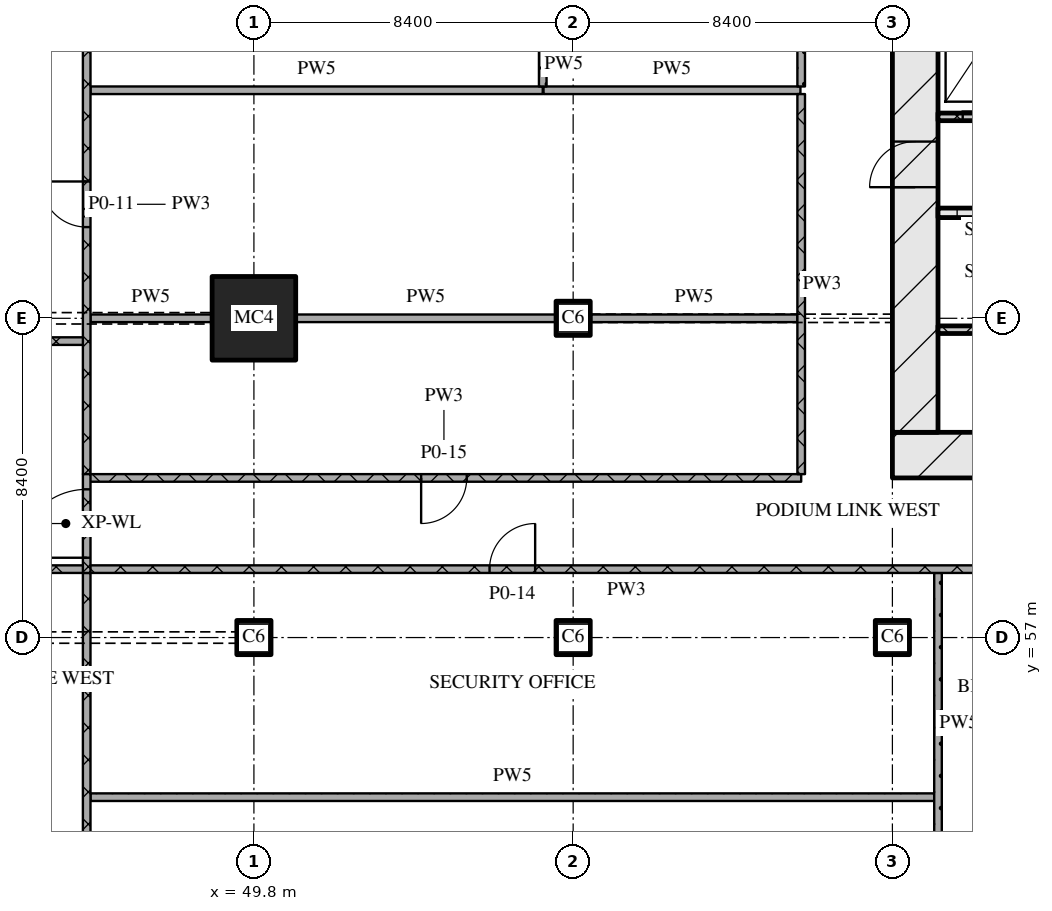
"""IFC4 building model, lengths in metres.
Left out: names, types, materials, properties, quantities, classifications, styles, units other than length and angle.
Written with IfcOpenShell. Run it as: python <this file> out.ifc"""

import sys

from ifc_helpers import new_model, si_unit, direction, frame, frame_2d, origin, origin_2d, place, context, subcontext, project, spatial, rectangle, extrude, element, fill, save


model = new_model("IFC4")
c1 = context("Model", 3, precision=1e-05, world=origin(), true_north=direction((0.0, 1.0)))
c2 = subcontext(c1, "Body", "Model", "MODEL_VIEW")
j1 = project(units=[si_unit("LENGTHUNIT", "METRE"), si_unit("PLANEANGLEUNIT", "RADIAN")], contexts=[c1])
p1 = place(None, origin())
s1 = spatial("IfcSite", under=j1, at=p1, CompositionType="ELEMENT")
p2 = place(p1, origin())
s2 = spatial("IfcBuilding", under=s1, at=p2, CompositionType="ELEMENT")
p3 = place(p2, origin())
s3 = spatial("IfcBuildingStorey", under=s2, at=p3, CompositionType="ELEMENT", Elevation=0.0)
p4 = place(p3, frame((49.8, 57.0, 0.0), z_axis=(0.0, 0.0, 1.0), x_axis=(1.0, 0.0, 0.0)))
e1 = element("IfcColumn", 1, at=p4, inside=s3, PredefinedType="COLUMN", context=c2, shape_type="SweptSolid", body=[
    extrude(rectangle(XDim=0.9, YDim=0.9, at=origin_2d()), origin(), (0.0, 0.0, 1.0), 9.0),
])
p5 = place(p3, frame((49.8, 65.4, 0.0), z_axis=(0.0, 0.0, 1.0), x_axis=(1.0, 0.0, 0.0)))
e2 = element("IfcColumn", 2, at=p5, inside=s3, PredefinedType="COLUMN", context=c2, shape_type="SweptSolid", body=[
    extrude(rectangle(XDim=2.2, YDim=2.2, at=origin_2d()), origin(), (0.0, 0.0, 1.0), 9.0),
])
for number, where, z_axis, x_axis in (
    (3, (58.2, 57.0, 0.0), (0.0, 0.0, 1.0), (1.0, 0.0, 0.0)),
    (4, (58.2, 65.4, 0.0), (0.0, 0.0, 1.0), (1.0, 0.0, 0.0)),
    (5, (66.6, 57.0, 0.0), (0.0, 0.0, 1.0), (1.0, 0.0, 0.0)),
):
    element("IfcColumn", number, at=place(p3, frame(where, z_axis=z_axis, x_axis=x_axis)), inside=s3, PredefinedType="COLUMN", context=c2, shape_type="SweptSolid", body=[
        extrude(rectangle(XDim=0.9, YDim=0.9, at=origin_2d()), origin(), (0.0, 0.0, 1.0), 9.0),
    ])
p6 = place(p3, frame((66.6, 61.8, 0.0), z_axis=(0.0, 0.0, 1.0), x_axis=(1.0, 0.0, 0.0)))
e6 = element("IfcWall", 6, at=p6, inside=s3, PredefinedType="SOLIDWALL", context=c2, shape_type="SweptSolid", body=[
    extrude(rectangle(XDim=42.0, YDim=1.2, at=frame_2d((21.0, 0.0))), origin(), (0.0, 0.0, 1.0), 8.7),
])
p7 = place(p6, frame((21.35, 0.0, 0.0)))
e7 = element("IfcOpeningElement", 7, at=p7, cuts=e6, PredefinedType="OPENING", context=c2, shape_type="SweptSolid", body=[
    extrude(rectangle(XDim=1.8, YDim=2.1, at=frame_2d((0.9, 1.05))), frame((0.0, 0.61, 0.0), z_axis=(0.0, -1.0, 0.0), x_axis=(1.0, 0.0, 0.0)), (0.0, 0.0, 1.0), 1.22),
])
p8 = place(p3, frame((67.2, 62.4, 0.0), z_axis=(0.0, 0.0, 1.0), x_axis=(0.0, 1.0, 0.0)))
e8 = element("IfcWall", 8, at=p8, inside=s3, PredefinedType="SOLIDWALL", context=c2, shape_type="SweptSolid", body=[
    extrude(rectangle(XDim=12.0, YDim=1.2, at=frame_2d((6.0, 0.0))), origin(), (0.0, 0.0, 1.0), 8.7),
])
p9 = place(p8, frame((6.45, 0.0, 0.0)))
e9 = element("IfcOpeningElement", 9, at=p9, cuts=e8, PredefinedType="OPENING", context=c2, shape_type="SweptSolid", body=[
    extrude(rectangle(XDim=1.2, YDim=2.1, at=frame_2d((0.6, 1.05))), frame((0.0, 0.61, 0.0), z_axis=(0.0, -1.0, 0.0), x_axis=(1.0, 0.0, 0.0)), (0.0, 0.0, 1.0), 1.22),
])
p10 = place(p3, frame((67.8, 65.1, 0.0), z_axis=(0.0, 0.0, 1.0), x_axis=(1.0, 0.0, 0.0)))
e10 = element("IfcWall", 10, at=p10, inside=s3, PredefinedType="SOLIDWALL", context=c2, shape_type="SweptSolid", body=[
    extrude(rectangle(XDim=18.5, YDim=0.2, at=frame_2d((9.25, 0.0))), origin(), (0.0, 0.0, 1.0), 8.7),
])
p11 = place(p10, frame((7.27, 0.0, 0.0)))
e11 = element("IfcOpeningElement", 11, at=p11, cuts=e10, PredefinedType="OPENING", context=c2, shape_type="SweptSolid", body=[
    extrude(rectangle(XDim=0.9, YDim=2.1, at=frame_2d((0.45, 1.05))), frame((0.0, 0.11, 0.0), z_axis=(0.0, -1.0, 0.0), x_axis=(1.0, 0.0, 0.0)), (0.0, 0.0, 1.0), 0.22),
])
p12 = place(p10, frame((8.85, 0.0, 0.0)))
e12 = element("IfcOpeningElement", 12, at=p12, cuts=e10, PredefinedType="OPENING", context=c2, shape_type="SweptSolid", body=[
    extrude(rectangle(XDim=1.1, YDim=2.1, at=frame_2d((0.55, 1.05))), frame((0.0, 0.11, 0.0), z_axis=(0.0, -1.0, 0.0), x_axis=(1.0, 0.0, 0.0)), (0.0, 0.0, 1.0), 0.22),
])
p13 = place(p10, frame((11.35, 0.0, 0.0)))
e13 = element("IfcOpeningElement", 13, at=p13, cuts=e10, PredefinedType="OPENING", context=c2, shape_type="SweptSolid", body=[
    extrude(rectangle(XDim=1.1, YDim=2.1, at=frame_2d((0.55, 1.05))), frame((0.0, 0.11, 0.0), z_axis=(0.0, -1.0, 0.0), x_axis=(1.0, 0.0, 0.0)), (0.0, 0.0, 1.0), 0.22),
])
p14 = place(p10, frame((13.85, 0.0, 0.0)))
e14 = element("IfcOpeningElement", 14, at=p14, cuts=e10, PredefinedType="OPENING", context=c2, shape_type="SweptSolid", body=[
    extrude(rectangle(XDim=1.1, YDim=2.1, at=frame_2d((0.55, 1.05))), frame((0.0, 0.11, 0.0), z_axis=(0.0, -1.0, 0.0), x_axis=(1.0, 0.0, 0.0)), (0.0, 0.0, 1.0), 0.22),
])
p15 = place(p10, frame((16.6, 0.0, 0.0)))
e15 = element("IfcOpeningElement", 15, at=p15, cuts=e10, PredefinedType="OPENING", context=c2, shape_type="SweptSolid", body=[
    extrude(rectangle(XDim=1.1, YDim=2.1, at=frame_2d((0.55, 1.05))), frame((0.0, 0.11, 0.0), z_axis=(0.0, -1.0, 0.0), x_axis=(1.0, 0.0, 0.0)), (0.0, 0.0, 1.0), 0.22),
])
p16 = place(p3, frame((67.8, 68.175, 0.0), z_axis=(0.0, 0.0, 1.0), x_axis=(1.0, 0.0, 0.0)))
e16 = element("IfcWall", 16, at=p16, inside=s3, PredefinedType="SOLIDWALL", context=c2, shape_type="SweptSolid", body=[
    extrude(rectangle(XDim=8.25, YDim=0.25, at=frame_2d((4.125, 0.0))), origin(), (0.0, 0.0, 1.0), 8.7),
])
p17 = place(p16, frame((5.7, 0.0, 0.0)))
e17 = element("IfcOpeningElement", 17, at=p17, cuts=e16, PredefinedType="OPENING", context=c2, shape_type="SweptSolid", body=[
    extrude(rectangle(XDim=1.0, YDim=2.1, at=frame_2d((0.5, 1.05))), frame((0.0, 0.135, 0.0), z_axis=(0.0, -1.0, 0.0), x_axis=(1.0, 0.0, 0.0)), (0.0, 0.0, 1.0), 0.27),
])
p18 = place(p16, frame((7.2, 0.0, 0.0)))
e18 = element("IfcOpeningElement", 18, at=p18, cuts=e16, PredefinedType="OPENING", context=c2, shape_type="SweptSolid", body=[
    extrude(rectangle(XDim=0.8, YDim=2.1, at=frame_2d((0.4, 1.05))), frame((0.0, 0.135, 0.0), z_axis=(0.0, -1.0, 0.0), x_axis=(1.0, 0.0, 0.0)), (0.0, 0.0, 1.0), 0.27),
])
p19 = place(p3, frame((67.8, 70.7, 0.0), z_axis=(0.0, 0.0, 1.0), x_axis=(1.0, 0.0, 0.0)))
e19 = element("IfcWall", 19, at=p19, inside=s3, PredefinedType="SOLIDWALL", context=c2, shape_type="SweptSolid", body=[
    extrude(rectangle(XDim=39.6, YDim=0.2, at=frame_2d((19.8, 0.0))), origin(), (0.0, 0.0, 1.0), 8.7),
])
p20 = place(p19, frame((0.65, 0.0, 0.0)))
e20 = element("IfcOpeningElement", 20, at=p20, cuts=e19, PredefinedType="OPENING", context=c2, shape_type="SweptSolid", body=[
    extrude(rectangle(XDim=1.1, YDim=2.1, at=frame_2d((0.55, 1.05))), frame((0.0, 0.11, 0.0), z_axis=(0.0, -1.0, 0.0), x_axis=(1.0, 0.0, 0.0)), (0.0, 0.0, 1.0), 0.22),
])
p21 = place(p19, frame((3.25, 0.0, 0.0)))
e21 = element("IfcOpeningElement", 21, at=p21, cuts=e19, PredefinedType="OPENING", context=c2, shape_type="SweptSolid", body=[
    extrude(rectangle(XDim=1.1, YDim=2.1, at=frame_2d((0.55, 1.05))), frame((0.0, 0.11, 0.0), z_axis=(0.0, -1.0, 0.0), x_axis=(1.0, 0.0, 0.0)), (0.0, 0.0, 1.0), 0.22),
])
p22 = place(p19, frame((5.9, 0.0, 0.0)))
e22 = element("IfcOpeningElement", 22, at=p22, cuts=e19, PredefinedType="OPENING", context=c2, shape_type="SweptSolid", body=[
    extrude(rectangle(XDim=1.0, YDim=2.1, at=frame_2d((0.5, 1.05))), frame((0.0, 0.11, 0.0), z_axis=(0.0, -1.0, 0.0), x_axis=(1.0, 0.0, 0.0)), (0.0, 0.0, 1.0), 0.22),
])
p23 = place(p19, frame((21.7, 0.0, 0.0)))
e23 = element("IfcOpeningElement", 23, at=p23, cuts=e19, PredefinedType="OPENING", context=c2, shape_type="SweptSolid", body=[
    extrude(rectangle(XDim=1.0, YDim=2.1, at=frame_2d((0.5, 1.05))), frame((0.0, 0.11, 0.0), z_axis=(0.0, -1.0, 0.0), x_axis=(1.0, 0.0, 0.0)), (0.0, 0.0, 1.0), 0.22),
])
p24 = place(p19, frame((32.7, 0.0, 0.0)))
e24 = element("IfcOpeningElement", 24, at=p24, cuts=e19, PredefinedType="OPENING", context=c2, shape_type="SweptSolid", body=[
    extrude(rectangle(XDim=1.0, YDim=2.1, at=frame_2d((0.5, 1.05))), frame((0.0, 0.11, 0.0), z_axis=(0.0, -1.0, 0.0), x_axis=(1.0, 0.0, 0.0)), (0.0, 0.0, 1.0), 0.22),
])
p25 = place(p19, frame((35.25, 0.0, 0.0)))
e25 = element("IfcOpeningElement", 25, at=p25, cuts=e19, PredefinedType="OPENING", context=c2, shape_type="SweptSolid", body=[
    extrude(rectangle(XDim=1.1, YDim=2.1, at=frame_2d((0.55, 1.05))), frame((0.0, 0.11, 0.0), z_axis=(0.0, -1.0, 0.0), x_axis=(1.0, 0.0, 0.0)), (0.0, 0.0, 1.0), 0.22),
])
p26 = place(p19, frame((37.85, 0.0, 0.0)))
e26 = element("IfcOpeningElement", 26, at=p26, cuts=e19, PredefinedType="OPENING", context=c2, shape_type="SweptSolid", body=[
    extrude(rectangle(XDim=1.1, YDim=2.1, at=frame_2d((0.55, 1.05))), frame((0.0, 0.11, 0.0), z_axis=(0.0, -1.0, 0.0), x_axis=(1.0, 0.0, 0.0)), (0.0, 0.0, 1.0), 0.22),
])
p27 = place(p3, frame((33.13, 58.8, 0.0), z_axis=(0.0, 0.0, 1.0), x_axis=(1.0, 0.0, 0.0)))
e27 = element("IfcWall", 27, at=p27, inside=s3, PredefinedType="PARTITIONING", context=c2, shape_type="SweptSolid", body=[
    extrude(rectangle(XDim=12.27, YDim=0.2, at=frame_2d((6.135, 0.0))), origin(), (0.0, 0.0, 1.0), 8.7),
])
p28 = place(p27, frame((3.695, 0.0, 0.0)))
e28 = element("IfcOpeningElement", 28, at=p28, cuts=e27, PredefinedType="OPENING", context=c2, shape_type="SweptSolid", body=[
    extrude(rectangle(XDim=1.2, YDim=2.1, at=frame_2d((0.6, 1.05))), frame((0.0, 0.11, 0.0), z_axis=(0.0, -1.0, 0.0), x_axis=(1.0, 0.0, 0.0)), (0.0, 0.0, 1.0), 0.22),
])
p29 = place(p3, frame((33.13, 64.8, 0.0), z_axis=(0.0, 0.0, 1.0), x_axis=(1.0, 0.0, 0.0)))
e29 = element("IfcWall", 29, at=p29, inside=s3, PredefinedType="PARTITIONING", context=c2, shape_type="SweptSolid", body=[
    extrude(rectangle(XDim=12.27, YDim=0.2, at=frame_2d((6.135, 0.0))), origin(), (0.0, 0.0, 1.0), 8.7),
])
p30 = place(p29, frame((3.695, 0.0, 0.0)))
e30 = element("IfcOpeningElement", 30, at=p30, cuts=e29, PredefinedType="OPENING", context=c2, shape_type="SweptSolid", body=[
    extrude(rectangle(XDim=1.2, YDim=2.1, at=frame_2d((0.6, 1.05))), frame((0.0, 0.11, 0.0), z_axis=(0.0, -1.0, 0.0), x_axis=(1.0, 0.0, 0.0)), (0.0, 0.0, 1.0), 0.22),
])
p31 = place(p3, frame((45.5, 52.8, 0.0), z_axis=(0.0, 0.0, 1.0), x_axis=(1.0, 0.0, 0.0)))
e31 = element("IfcWall", 31, at=p31, inside=s3, PredefinedType="PARTITIONING", context=c2, shape_type="SweptSolid", body=[
    extrude(rectangle(XDim=22.2, YDim=0.2, at=frame_2d((11.1, 0.0))), origin(), (0.0, 0.0, 1.0), 8.7),
])
p32 = place(p3, frame((73.8, 58.8, 0.0), z_axis=(0.0, 0.0, 1.0), x_axis=(-1.0, 0.0, 0.0)))
e32 = element("IfcWall", 32, at=p32, inside=s3, PredefinedType="PARTITIONING", context=c2, shape_type="SweptSolid", body=[
    extrude(rectangle(XDim=28.4, YDim=0.2, at=frame_2d((14.2, 0.0))), origin(), (0.0, 0.0, 1.0), 8.7),
])
p33 = place(p32, frame((16.6, 0.0, 0.0)))
e33 = element("IfcOpeningElement", 33, at=p33, cuts=e32, PredefinedType="OPENING", context=c2, shape_type="SweptSolid", body=[
    extrude(rectangle(XDim=1.2, YDim=2.1, at=frame_2d((0.6, 1.05))), frame((0.0, 0.11, 0.0), z_axis=(0.0, -1.0, 0.0), x_axis=(1.0, 0.0, 0.0)), (0.0, 0.0, 1.0), 0.22),
])
p34 = place(p3, frame((45.4, 61.2, 0.0), z_axis=(0.0, 0.0, 1.0), x_axis=(1.0, 0.0, 0.0)))
e34 = element("IfcWall", 34, at=p34, inside=s3, PredefinedType="PARTITIONING", context=c2, shape_type="SweptSolid", body=[
    extrude(rectangle(XDim=18.8, YDim=0.2, at=frame_2d((9.4, 0.0))), origin(), (0.0, 0.0, 1.0), 8.7),
])
p35 = place(p34, frame((8.8, 0.0, 0.0)))
e35 = element("IfcOpeningElement", 35, at=p35, cuts=e34, PredefinedType="OPENING", context=c2, shape_type="SweptSolid", body=[
    extrude(rectangle(XDim=1.2, YDim=2.1, at=frame_2d((0.6, 1.05))), frame((0.0, 0.11, 0.0), z_axis=(0.0, -1.0, 0.0), x_axis=(1.0, 0.0, 0.0)), (0.0, 0.0, 1.0), 0.22),
])
p36 = place(p3, frame((45.5, 65.4, 0.0), z_axis=(0.0, 0.0, 1.0), x_axis=(1.0, 0.0, 0.0)))
e36 = element("IfcWall", 36, at=p36, inside=s3, PredefinedType="PARTITIONING", context=c2, shape_type="SweptSolid", body=[
    extrude(rectangle(XDim=3.18, YDim=0.2, at=frame_2d((1.59, 0.0))), origin(), (0.0, 0.0, 1.0), 7.71),
])
p37 = place(p3, frame((50.92, 65.4, 0.0), z_axis=(0.0, 0.0, 1.0), x_axis=(1.0, 0.0, 0.0)))
e37 = element("IfcWall", 37, at=p37, inside=s3, PredefinedType="PARTITIONING", context=c2, shape_type="SweptSolid", body=[
    extrude(rectangle(XDim=6.81, YDim=0.2, at=frame_2d((3.405, 0.0))), origin(), (0.0, 0.0, 1.0), 8.7),
])
p38 = place(p3, frame((58.67, 65.4, 0.0), z_axis=(0.0, 0.0, 1.0), x_axis=(1.0, 0.0, 0.0)))
e38 = element("IfcWall", 38, at=p38, inside=s3, PredefinedType="PARTITIONING", context=c2, shape_type="SweptSolid", body=[
    extrude(rectangle(XDim=5.43, YDim=0.2, at=frame_2d((2.715, 0.0))), origin(), (0.0, 0.0, 1.0), 8.1),
])
p39 = place(p3, frame((57.42, 71.4, 0.0), z_axis=(0.0, 0.0, 1.0), x_axis=(1.0, 0.0, 0.0)))
e39 = element("IfcWall", 39, at=p39, inside=s3, PredefinedType="PARTITIONING", context=c2, shape_type="SweptSolid", body=[
    extrude(rectangle(XDim=6.76, YDim=0.2, at=frame_2d((3.38, 0.0))), origin(), (0.0, 0.0, 1.0), 8.7),
])
p40 = place(p3, frame((45.5, 71.4, 0.0), z_axis=(0.0, 0.0, 1.0), x_axis=(1.0, 0.0, 0.0)))
e40 = element("IfcWall", 40, at=p40, inside=s3, PredefinedType="PARTITIONING", context=c2, shape_type="SweptSolid", body=[
    extrude(rectangle(XDim=11.9, YDim=0.2, at=frame_2d((5.95, 0.0))), origin(), (0.0, 0.0, 1.0), 8.7),
])
p41 = place(p3, frame((45.4, 58.7, 0.0), z_axis=(0.0, 0.0, 1.0), x_axis=(0.0, -1.0, 0.0)))
e41 = element("IfcWall", 41, at=p41, inside=s3, PredefinedType="PARTITIONING", context=c2, shape_type="SweptSolid", body=[
    extrude(rectangle(XDim=24.4, YDim=0.2, at=frame_2d((12.2, 0.0))), origin(), (0.0, 0.0, 1.0), 8.7),
])
p42 = place(p41, frame((14.55, 0.0, 0.0)))
e42 = element("IfcOpeningElement", 42, at=p42, cuts=e41, PredefinedType="OPENING", context=c2, shape_type="SweptSolid", body=[
    extrude(rectangle(XDim=1.2, YDim=2.1, at=frame_2d((0.6, 1.05))), frame((0.0, 0.11, 0.0), z_axis=(0.0, -1.0, 0.0), x_axis=(1.0, 0.0, 0.0)), (0.0, 0.0, 1.0), 0.22),
])
p43 = place(p3, frame((45.4, 75.5, 0.0), z_axis=(0.0, 0.0, 1.0), x_axis=(0.0, -1.0, 0.0)))
e43 = element("IfcWall", 43, at=p43, inside=s3, PredefinedType="PARTITIONING", context=c2, shape_type="SweptSolid", body=[
    extrude(rectangle(XDim=14.2, YDim=0.2, at=frame_2d((7.1, 0.0))), origin(), (0.0, 0.0, 1.0), 8.7),
])
p44 = place(p43, frame((6.5, 0.0, 0.0)))
e44 = element("IfcOpeningElement", 44, at=p44, cuts=e43, PredefinedType="OPENING", context=c2, shape_type="SweptSolid", body=[
    extrude(rectangle(XDim=1.2, YDim=2.1, at=frame_2d((0.6, 1.05))), frame((0.0, 0.11, 0.0), z_axis=(0.0, -1.0, 0.0), x_axis=(1.0, 0.0, 0.0)), (0.0, 0.0, 1.0), 0.22),
])
p45 = place(p3, frame((57.4, 72.68, 0.0), z_axis=(0.0, 0.0, 1.0), x_axis=(0.0, -1.0, 0.0)))
e45 = element("IfcWall", 45, at=p45, inside=s3, PredefinedType="PARTITIONING", context=c2, shape_type="SweptSolid", body=[
    extrude(rectangle(XDim=1.18, YDim=0.2, at=frame_2d((0.59, 0.0))), origin(), (0.0, 0.0, 1.0), 8.7),
])
p46 = place(p3, frame((64.2, 71.3, 0.0), z_axis=(0.0, 0.0, 1.0), x_axis=(0.0, -1.0, 0.0)))
e46 = element("IfcWall", 46, at=p46, inside=s3, PredefinedType="PARTITIONING", context=c2, shape_type="SweptSolid", body=[
    extrude(rectangle(XDim=10.0, YDim=0.2, at=frame_2d((5.0, 0.0))), origin(), (0.0, 0.0, 1.0), 8.7),
])
p47 = place(p3, frame((64.2, 75.5, 0.0), z_axis=(0.0, 0.0, 1.0), x_axis=(0.0, -1.0, 0.0)))
e47 = element("IfcWall", 47, at=p47, inside=s3, PredefinedType="PARTITIONING", context=c2, shape_type="SweptSolid", body=[
    extrude(rectangle(XDim=4.0, YDim=0.2, at=frame_2d((2.0, 0.0))), origin(), (0.0, 0.0, 1.0), 8.7),
])
p48 = place(p3, frame((67.8, 58.7, 0.0), z_axis=(0.0, 0.0, 1.0), x_axis=(0.0, -1.0, 0.0)))
e48 = element("IfcWall", 48, at=p48, inside=s3, PredefinedType="PARTITIONING", context=c2, shape_type="SweptSolid", body=[
    extrude(rectangle(XDim=7.9, YDim=0.2, at=frame_2d((3.95, 0.0))), origin(), (0.0, 0.0, 1.0), 8.7),
])
p49 = place(p3, frame((45.4, 58.7, 0.0), z_axis=(0.0, 0.0, 1.0), x_axis=(0.0, 1.0, 0.0)))
e49 = element("IfcWall", 49, at=p49, inside=s3, PredefinedType="PARTITIONING", context=c2, shape_type="SweptSolid", body=[
    extrude(rectangle(XDim=2.6, YDim=0.2, at=frame_2d((1.3, 0.0))), origin(), (0.0, 0.0, 1.0), 8.7),
])
p50 = place(p49, frame((0.4, 0.0, 0.0)))
e50 = element("IfcOpeningElement", 50, at=p50, cuts=e49, PredefinedType="OPENING", context=c2, shape_type="SweptSolid", body=[
    extrude(rectangle(XDim=1.8, YDim=2.1, at=frame_2d((0.9, 1.05))), frame((0.0, 0.11, 0.0), z_axis=(0.0, -1.0, 0.0), x_axis=(1.0, 0.0, 0.0)), (0.0, 0.0, 1.0), 0.22),
])
p51 = place(p9, origin())
e51 = element("IfcDoor", 51, at=p51, inside=s3, OperationType="SINGLE_SWING_LEFT", PredefinedType="DOOR", context=c2, shape_type="SweptSolid", body=[
    extrude(rectangle(XDim=1.2, YDim=2.1, at=frame_2d((0.6, 1.05))), frame((0.0, 0.025, 0.0), z_axis=(0.0, -1.0, 0.0), x_axis=(1.0, 0.0, 0.0)), (0.0, 0.0, 1.0), 0.05),
])
fill(e9, e51)
p52 = place(p20, origin())
e52 = element("IfcDoor", 52, at=p52, inside=s3, OperationType="SLIDING_TO_RIGHT", PredefinedType="DOOR", context=c2, shape_type="SweptSolid", body=[
    extrude(rectangle(XDim=1.1, YDim=2.1, at=frame_2d((0.55, 1.05))), frame((0.0, 0.025, 0.0), z_axis=(0.0, -1.0, 0.0), x_axis=(1.0, 0.0, 0.0)), (0.0, 0.0, 1.0), 0.05),
])
fill(e20, e52)
p53 = place(p33, origin())
e53 = element("IfcDoor", 53, at=p53, inside=s3, OperationType="SINGLE_SWING_RIGHT", PredefinedType="DOOR", context=c2, shape_type="SweptSolid", body=[
    extrude(rectangle(XDim=1.2, YDim=2.1, at=frame_2d((0.6, 1.05))), frame((0.0, 0.025, 0.0), z_axis=(0.0, -1.0, 0.0), x_axis=(1.0, 0.0, 0.0)), (0.0, 0.0, 1.0), 0.05),
])
fill(e33, e53)
p54 = place(p35, origin())
e54 = element("IfcDoor", 54, at=p54, inside=s3, OperationType="SINGLE_SWING_RIGHT", PredefinedType="DOOR", context=c2, shape_type="SweptSolid", body=[
    extrude(rectangle(XDim=1.2, YDim=2.1, at=frame_2d((0.6, 1.05))), frame((0.0, 0.025, 0.0), z_axis=(0.0, -1.0, 0.0), x_axis=(1.0, 0.0, 0.0)), (0.0, 0.0, 1.0), 0.05),
])
fill(e35, e54)
p55 = place(p44, origin())
e55 = element("IfcDoor", 55, at=p55, inside=s3, OperationType="SINGLE_SWING_RIGHT", PredefinedType="DOOR", context=c2, shape_type="SweptSolid", body=[
    extrude(rectangle(XDim=1.2, YDim=2.1, at=frame_2d((0.6, 1.05))), frame((0.0, 0.025, 0.0), z_axis=(0.0, -1.0, 0.0), x_axis=(1.0, 0.0, 0.0)), (0.0, 0.0, 1.0), 0.05),
])
fill(e44, e55)
p56 = place(p50, origin())
e56 = element("IfcDoor", 56, at=p56, inside=s3, OperationType="DOUBLE_DOOR_SINGLE_SWING", PredefinedType="DOOR", context=c2, shape_type="SweptSolid", body=[
    extrude(rectangle(XDim=1.8, YDim=2.1, at=frame_2d((0.9, 1.05))), frame((0.0, 0.025, 0.0), z_axis=(0.0, -1.0, 0.0), x_axis=(1.0, 0.0, 0.0)), (0.0, 0.0, 1.0), 0.05),
])
fill(e50, e56)
save(model, sys.argv[1])
